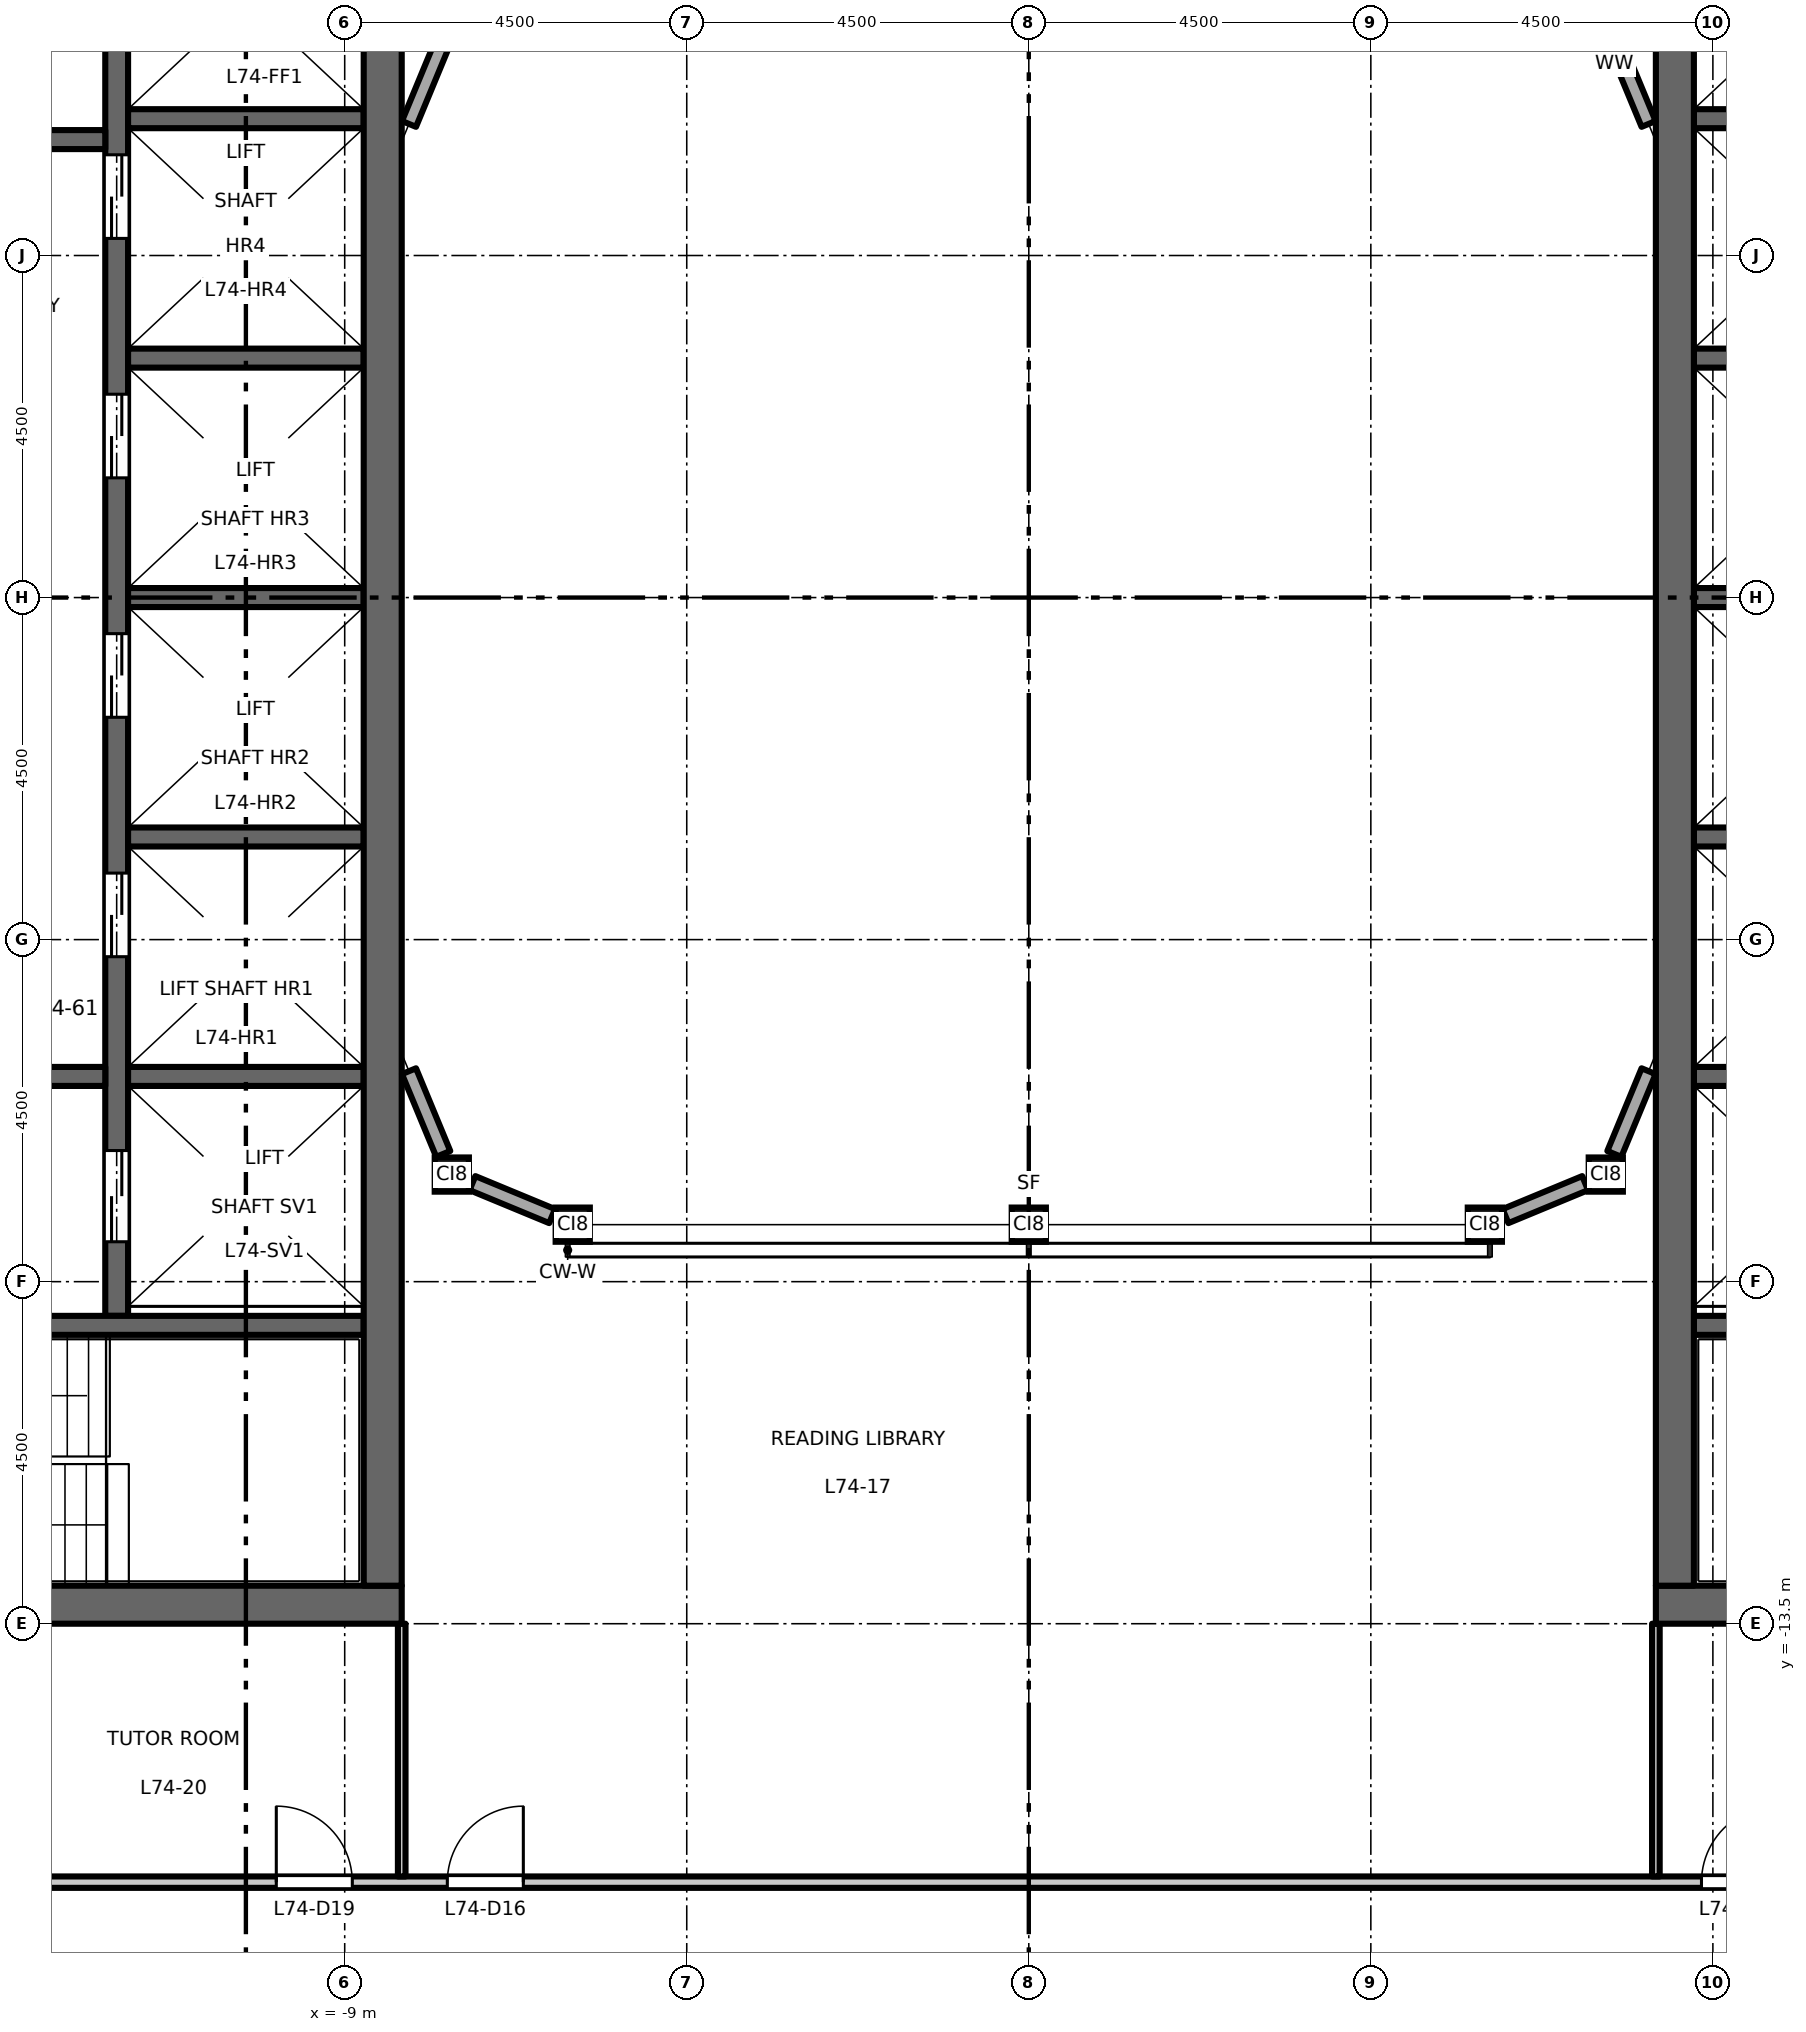
"""IFC4 building model, lengths in metres.
Left out: names, types, materials, properties, quantities, classifications, styles, units other than length and angle.
Written with IfcOpenShell. Run it as: python <this file> out.ifc"""

import sys

from ifc_helpers import new_model, si_unit, direction, frame, frame_2d, origin, origin_2d, place, context, subcontext, project, spatial, rectangle, hollow_rectangle, extrude, element, fill, save


model = new_model("IFC4")
c1 = context("Model", 3, precision=1e-05, world=origin(), true_north=direction((0.0, 1.0)))
c2 = subcontext(c1, "Body", "Model", "MODEL_VIEW")
j1 = project(units=[si_unit("LENGTHUNIT", "METRE"), si_unit("PLANEANGLEUNIT", "RADIAN")], contexts=[c1])
p1 = place(None, origin())
s1 = spatial("IfcSite", under=j1, at=p1, CompositionType="ELEMENT")
p2 = place(p1, origin())
s2 = spatial("IfcBuilding", under=s1, at=p2, CompositionType="ELEMENT")
p3 = place(p2, frame((0.0, 0.0, 343.7)))
s3 = spatial("IfcBuildingStorey", under=s2, at=p3, CompositionType="ELEMENT", Elevation=343.7)
for number, where, z_axis, x_axis in (
    (1, (-7.591, -7.591, 0.0), (0.0, 0.0, 1.0), (1.0, 0.0, 0.0)),
    (2, (-6.0, -8.25, 0.0), (0.0, 0.0, 1.0), (1.0, 0.0, 0.0)),
    (3, (0.0, -8.25, 0.0), (0.0, 0.0, 1.0), (1.0, 0.0, 0.0)),
    (4, (6.0, -8.25, 0.0), (0.0, 0.0, 1.0), (1.0, 0.0, 0.0)),
    (5, (7.591, -7.591, 0.0), (0.0, 0.0, 1.0), (1.0, 0.0, 0.0)),
):
    element("IfcColumn", number, at=place(p3, frame(where, z_axis=z_axis, x_axis=x_axis)), inside=s3, PredefinedType="COLUMN", context=c2, shape_type="SweptSolid", body=[
        extrude(hollow_rectangle(XDim=0.45, YDim=0.45, WallThickness=0.022, at=origin_2d()), origin(), (0.0, 0.0, 1.0), 4.5),
    ])
p4 = place(p3, frame((-12.0, -9.45, 0.0), z_axis=(0.0, 0.0, 1.0), x_axis=(0.0, 1.0, 0.0)))
e6 = element("IfcWall", 6, at=p4, inside=s3, PredefinedType="SHEAR", context=c2, shape_type="SweptSolid", body=[
    extrude(rectangle(XDim=18.9, YDim=0.3, at=frame_2d((9.45, 0.0))), origin(), (0.0, 0.0, 1.0), 4.3),
])
p5 = place(p4, frame((4.725, 0.0, 0.0)))
e7 = element("IfcOpeningElement", 7, at=p5, cuts=e6, PredefinedType="OPENING", context=c2, shape_type="SweptSolid", body=[
    extrude(rectangle(XDim=1.1, YDim=2.1, at=frame_2d((0.55, 1.05))), frame((0.0, 0.16, 0.0), z_axis=(0.0, -1.0, 0.0), x_axis=(1.0, 0.0, 0.0)), (0.0, 0.0, 1.0), 0.32),
])
p6 = place(p4, frame((7.875, 0.0, 0.0)))
e8 = element("IfcOpeningElement", 8, at=p6, cuts=e6, PredefinedType="OPENING", context=c2, shape_type="SweptSolid", body=[
    extrude(rectangle(XDim=1.1, YDim=2.1, at=frame_2d((0.55, 1.05))), frame((0.0, 0.16, 0.0), z_axis=(0.0, -1.0, 0.0), x_axis=(1.0, 0.0, 0.0)), (0.0, 0.0, 1.0), 0.32),
])
p7 = place(p4, frame((11.025, 0.0, 0.0)))
e9 = element("IfcOpeningElement", 9, at=p7, cuts=e6, PredefinedType="OPENING", context=c2, shape_type="SweptSolid", body=[
    extrude(rectangle(XDim=1.1, YDim=2.1, at=frame_2d((0.55, 1.05))), frame((0.0, 0.16, 0.0), z_axis=(0.0, -1.0, 0.0), x_axis=(1.0, 0.0, 0.0)), (0.0, 0.0, 1.0), 0.32),
])
p8 = place(p4, frame((14.175, 0.0, 0.0)))
e10 = element("IfcOpeningElement", 10, at=p8, cuts=e6, PredefinedType="OPENING", context=c2, shape_type="SweptSolid", body=[
    extrude(rectangle(XDim=1.1, YDim=2.1, at=frame_2d((0.55, 1.05))), frame((0.0, 0.16, 0.0), z_axis=(0.0, -1.0, 0.0), x_axis=(1.0, 0.0, 0.0)), (0.0, 0.0, 1.0), 0.32),
])
p9 = place(p4, frame((16.725, 0.0, 0.0)))
e11 = element("IfcOpeningElement", 11, at=p9, cuts=e6, PredefinedType="OPENING", context=c2, shape_type="SweptSolid", body=[
    extrude(rectangle(XDim=1.2, YDim=2.1, at=frame_2d((0.6, 1.05))), frame((0.0, 0.16, 0.0), z_axis=(0.0, -1.0, 0.0), x_axis=(1.0, 0.0, 0.0)), (0.0, 0.0, 1.0), 0.32),
])
p10 = place(p4, frame((0.975, 0.0, 0.0)))
e12 = element("IfcOpeningElement", 12, at=p10, cuts=e6, PredefinedType="OPENING", context=c2, shape_type="SweptSolid", body=[
    extrude(rectangle(XDim=1.2, YDim=2.1, at=frame_2d((0.6, 1.05))), frame((0.0, 0.16, 0.0), z_axis=(0.0, -1.0, 0.0), x_axis=(1.0, 0.0, 0.0)), (0.0, 0.0, 1.0), 0.32),
])
p11 = place(p3, frame((-12.15, 6.025, 0.0), z_axis=(0.0, 0.0, 1.0), x_axis=(-1.0, 0.0, 0.0)))
e13 = element("IfcWall", 13, at=p11, inside=s3, PredefinedType="SHEAR", context=c2, shape_type="SweptSolid", body=[
    extrude(rectangle(XDim=4.6, YDim=0.25, at=frame_2d((2.3, 0.0))), origin(), (0.0, 0.0, 1.0), 4.3),
])
p12 = place(p11, frame((1.8, 0.0, 0.0)))
e14 = element("IfcOpeningElement", 14, at=p12, cuts=e13, PredefinedType="OPENING", context=c2, shape_type="SweptSolid", body=[
    extrude(rectangle(XDim=1.0, YDim=2.1, at=frame_2d((0.5, 1.05))), frame((0.0, 0.135, 0.0), z_axis=(0.0, -1.0, 0.0), x_axis=(1.0, 0.0, 0.0)), (0.0, 0.0, 1.0), 0.27),
])
p13 = place(p3, frame((-12.15, -6.3, 0.0), z_axis=(0.0, 0.0, 1.0), x_axis=(-1.0, 0.0, 0.0)))
e15 = element("IfcWall", 15, at=p13, inside=s3, PredefinedType="SHEAR", context=c2, shape_type="SweptSolid", body=[
    extrude(rectangle(XDim=4.6, YDim=0.25, at=frame_2d((2.3, 0.0))), origin(), (0.0, 0.0, 1.0), 4.3),
])
p14 = place(p13, frame((1.8, 0.0, 0.0)))
e16 = element("IfcOpeningElement", 16, at=p14, cuts=e15, PredefinedType="OPENING", context=c2, shape_type="SweptSolid", body=[
    extrude(rectangle(XDim=1.0, YDim=2.1, at=frame_2d((0.5, 1.05))), frame((0.0, 0.135, 0.0), z_axis=(0.0, -1.0, 0.0), x_axis=(1.0, 0.0, 0.0)), (0.0, 0.0, 1.0), 0.27),
])
for number, where, z_axis, x_axis in (
    (17, (-8.75, 0.0, 0.0), (0.0, 0.0, 1.0), (-1.0, 0.0, 0.0)),
    (18, (-8.75, 3.15, 0.0), (0.0, 0.0, 1.0), (-1.0, 0.0, 0.0)),
    (19, (-8.75, 6.3, 0.0), (0.0, 0.0, 1.0), (-1.0, 0.0, 0.0)),
    (20, (-8.75, -3.15, 0.0), (0.0, 0.0, 1.0), (-1.0, 0.0, 0.0)),
    (21, (-8.75, -6.3, 0.0), (0.0, 0.0, 1.0), (-1.0, 0.0, 0.0)),
):
    element("IfcWall", number, at=place(p3, frame(where, z_axis=z_axis, x_axis=x_axis)), inside=s3, PredefinedType="SHEAR", context=c2, shape_type="SweptSolid", body=[
        extrude(rectangle(XDim=3.1, YDim=0.25, at=frame_2d((1.55, 0.0))), origin(), (0.0, 0.0, 1.0), 4.3),
    ])
p15 = place(p3, frame((-8.75, -9.575, 0.0), z_axis=(0.0, 0.0, 1.0), x_axis=(-1.0, 0.0, 0.0)))
e22 = element("IfcWall", 22, at=p15, inside=s3, PredefinedType="SHEAR", context=c2, shape_type="SweptSolid", body=[
    extrude(rectangle(XDim=8.0, YDim=0.25, at=frame_2d((4.0, 0.0))), origin(), (0.0, 0.0, 1.0), 4.3),
])
p16 = place(p15, frame((6.65, 0.0, 0.0)))
e23 = element("IfcOpeningElement", 23, at=p16, cuts=e22, PredefinedType="OPENING", context=c2, shape_type="SweptSolid", body=[
    extrude(rectangle(XDim=1.1, YDim=2.1, at=frame_2d((0.55, 1.05))), frame((0.0, 0.135, 0.0), z_axis=(0.0, -1.0, 0.0), x_axis=(1.0, 0.0, 0.0)), (0.0, 0.0, 1.0), 0.27),
])
p17 = place(p3, frame((-8.25, -13.25, 0.0), z_axis=(0.0, 0.0, 1.0), x_axis=(-1.0, 0.0, 0.0)))
e24 = element("IfcWall", 24, at=p17, inside=s3, PredefinedType="SHEAR", context=c2, shape_type="SweptSolid", body=[
    extrude(rectangle(XDim=9.0, YDim=0.5, at=frame_2d((4.5, 0.0))), origin(), (0.0, 0.0, 1.0), 4.3),
])
p18 = place(p3, frame((-8.5, -13.0, 0.0), z_axis=(0.0, 0.0, 1.0), x_axis=(0.0, 1.0, 0.0)))
e25 = element("IfcWall", 25, at=p18, inside=s3, PredefinedType="SHEAR", context=c2, shape_type="SweptSolid", body=[
    extrude(rectangle(XDim=26.0, YDim=0.5, at=frame_2d((13.0, 0.0))), origin(), (0.0, 0.0, 1.0), 4.3),
])
for number, where, z_axis, x_axis in (
    (26, (8.75, 0.0, 0.0), (0.0, 0.0, 1.0), (1.0, 0.0, 0.0)),
    (27, (8.75, 3.15, 0.0), (0.0, 0.0, 1.0), (1.0, 0.0, 0.0)),
    (28, (8.75, 6.3, 0.0), (0.0, 0.0, 1.0), (1.0, 0.0, 0.0)),
    (29, (8.75, -3.15, 0.0), (0.0, 0.0, 1.0), (1.0, 0.0, 0.0)),
    (30, (8.75, -6.3, 0.0), (0.0, 0.0, 1.0), (1.0, 0.0, 0.0)),
):
    element("IfcWall", number, at=place(p3, frame(where, z_axis=z_axis, x_axis=x_axis)), inside=s3, PredefinedType="SHEAR", context=c2, shape_type="SweptSolid", body=[
        extrude(rectangle(XDim=3.1, YDim=0.25, at=frame_2d((1.55, 0.0))), origin(), (0.0, 0.0, 1.0), 4.3),
    ])
p19 = place(p3, frame((8.75, -9.575, 0.0), z_axis=(0.0, 0.0, 1.0), x_axis=(1.0, 0.0, 0.0)))
e31 = element("IfcWall", 31, at=p19, inside=s3, PredefinedType="SHEAR", context=c2, shape_type="SweptSolid", body=[
    extrude(rectangle(XDim=8.0, YDim=0.25, at=frame_2d((4.0, 0.0))), origin(), (0.0, 0.0, 1.0), 4.3),
])
p20 = place(p19, frame((6.65, 0.0, 0.0)))
e32 = element("IfcOpeningElement", 32, at=p20, cuts=e31, PredefinedType="OPENING", context=c2, shape_type="SweptSolid", body=[
    extrude(rectangle(XDim=1.1, YDim=2.1, at=frame_2d((0.55, 1.05))), frame((0.0, 0.135, 0.0), z_axis=(0.0, -1.0, 0.0), x_axis=(1.0, 0.0, 0.0)), (0.0, 0.0, 1.0), 0.27),
])
p21 = place(p3, frame((8.25, -13.25, 0.0), z_axis=(0.0, 0.0, 1.0), x_axis=(1.0, 0.0, 0.0)))
e33 = element("IfcWall", 33, at=p21, inside=s3, PredefinedType="SHEAR", context=c2, shape_type="SweptSolid", body=[
    extrude(rectangle(XDim=9.0, YDim=0.5, at=frame_2d((4.5, 0.0))), origin(), (0.0, 0.0, 1.0), 4.3),
])
p22 = place(p3, frame((8.5, -13.0, 0.0), z_axis=(0.0, 0.0, 1.0), x_axis=(0.0, 1.0, 0.0)))
e34 = element("IfcWall", 34, at=p22, inside=s3, PredefinedType="SHEAR", context=c2, shape_type="SweptSolid", body=[
    extrude(rectangle(XDim=26.0, YDim=0.5, at=frame_2d((13.0, 0.0))), origin(), (0.0, 0.0, 1.0), 4.3),
])
p23 = place(p3, frame((6.271, -8.137, 0.0), z_axis=(0.0, 0.0, 1.0), x_axis=(0.923864661962, 0.382719331074, 0.0)))
e35 = element("IfcWall", 35, at=p23, inside=s3, PredefinedType="STANDARD", context=c2, shape_type="SweptSolid", body=[
    extrude(rectangle(XDim=1.134, YDim=0.2, at=frame_2d((0.567, 0.0))), origin(), (0.0, 0.0, 1.0), 3.96),
])
for number, where, z_axis, x_axis in (
    (36, (7.703, -7.319, 0.0), (0.0, 0.0, 1.0), (0.383, 0.924, 0.0)),
    (37, (8.154, 6.231, 0.0), (0.0, 0.0, 1.0), (-0.383, 0.924, 0.0)),
    (38, (-7.703, 7.319, 0.0), (0.0, 0.0, 1.0), (-0.383, -0.924, 0.0)),
    (39, (-8.154, -6.231, 0.0), (0.0, 0.0, 1.0), (0.383, -0.924, 0.0)),
):
    element("IfcWall", number, at=place(p3, frame(where, z_axis=z_axis, x_axis=x_axis)), inside=s3, PredefinedType="STANDARD", context=c2, shape_type="SweptSolid", body=[
        extrude(rectangle(XDim=1.178, YDim=0.2, at=frame_2d((0.589, 0.0))), origin(), (0.0, 0.0, 1.0), 3.96),
    ])
p24 = place(p3, frame((-7.319, -7.703, 0.0), z_axis=(0.0, 0.0, 1.0), x_axis=(0.923864661962, -0.382719331074, 0.0)))
e40 = element("IfcWall", 40, at=p24, inside=s3, PredefinedType="STANDARD", context=c2, shape_type="SweptSolid", body=[
    extrude(rectangle(XDim=1.134, YDim=0.2, at=frame_2d((0.567, 0.0))), origin(), (0.0, 0.0, 1.0), 3.96),
])
p25 = place(p3, frame((-17.325, -16.9, 0.0), z_axis=(0.0, 0.0, 1.0), x_axis=(1.0, 0.0, 0.0)))
e41 = element("IfcWall", 41, at=p25, inside=s3, PredefinedType="PARTITIONING", context=c2, shape_type="SweptSolid", body=[
    extrude(rectangle(XDim=34.65, YDim=0.15, at=frame_2d((17.325, 0.0))), origin(), (0.0, 0.0, 1.0), 4.3),
])
p26 = place(p25, frame((9.675, 0.0, 0.0)))
e42 = element("IfcOpeningElement", 42, at=p26, cuts=e41, PredefinedType="OPENING", context=c2, shape_type="SweptSolid", body=[
    extrude(rectangle(XDim=1.0, YDim=2.1, at=frame_2d((0.5, 1.05))), frame((0.0, 0.085, 0.0), z_axis=(0.0, -1.0, 0.0), x_axis=(1.0, 0.0, 0.0)), (0.0, 0.0, 1.0), 0.17),
])
p27 = place(p25, frame((7.425, 0.0, 0.0)))
e43 = element("IfcOpeningElement", 43, at=p27, cuts=e41, PredefinedType="OPENING", context=c2, shape_type="SweptSolid", body=[
    extrude(rectangle(XDim=1.0, YDim=2.1, at=frame_2d((0.5, 1.05))), frame((0.0, 0.085, 0.0), z_axis=(0.0, -1.0, 0.0), x_axis=(1.0, 0.0, 0.0)), (0.0, 0.0, 1.0), 0.17),
])
p28 = place(p25, frame((26.175, 0.0, 0.0)))
e44 = element("IfcOpeningElement", 44, at=p28, cuts=e41, PredefinedType="OPENING", context=c2, shape_type="SweptSolid", body=[
    extrude(rectangle(XDim=1.0, YDim=2.1, at=frame_2d((0.5, 1.05))), frame((0.0, 0.085, 0.0), z_axis=(0.0, -1.0, 0.0), x_axis=(1.0, 0.0, 0.0)), (0.0, 0.0, 1.0), 0.17),
])
for number, where, z_axis, x_axis in (
    (45, (-8.25, -16.825, 0.0), (0.0, 0.0, 1.0), (0.0, 1.0, 0.0)),
    (46, (8.25, -16.825, 0.0), (0.0, 0.0, 1.0), (0.0, 1.0, 0.0)),
):
    element("IfcWall", number, at=place(p3, frame(where, z_axis=z_axis, x_axis=x_axis)), inside=s3, PredefinedType="PARTITIONING", context=c2, shape_type="SweptSolid", body=[
        extrude(rectangle(XDim=3.325, YDim=0.1, at=frame_2d((1.663, 0.0))), origin(), (0.0, 0.0, 1.0), 4.3),
    ])
p29 = place(p5, origin())
e47 = element("IfcDoor", 47, at=p29, inside=s3, OperationType="DOUBLE_DOOR_SLIDING", PredefinedType="DOOR", context=c2, shape_type="SweptSolid", body=[
    extrude(rectangle(XDim=1.1, YDim=2.1, at=frame_2d((0.55, 1.05))), frame((0.0, 0.025, 0.0), z_axis=(0.0, -1.0, 0.0), x_axis=(1.0, 0.0, 0.0)), (0.0, 0.0, 1.0), 0.05),
])
fill(e7, e47)
p30 = place(p6, origin())
e48 = element("IfcDoor", 48, at=p30, inside=s3, OperationType="DOUBLE_DOOR_SLIDING", PredefinedType="DOOR", context=c2, shape_type="SweptSolid", body=[
    extrude(rectangle(XDim=1.1, YDim=2.1, at=frame_2d((0.55, 1.05))), frame((0.0, 0.025, 0.0), z_axis=(0.0, -1.0, 0.0), x_axis=(1.0, 0.0, 0.0)), (0.0, 0.0, 1.0), 0.05),
])
fill(e8, e48)
p31 = place(p7, origin())
e49 = element("IfcDoor", 49, at=p31, inside=s3, OperationType="DOUBLE_DOOR_SLIDING", PredefinedType="DOOR", context=c2, shape_type="SweptSolid", body=[
    extrude(rectangle(XDim=1.1, YDim=2.1, at=frame_2d((0.55, 1.05))), frame((0.0, 0.025, 0.0), z_axis=(0.0, -1.0, 0.0), x_axis=(1.0, 0.0, 0.0)), (0.0, 0.0, 1.0), 0.05),
])
fill(e9, e49)
p32 = place(p8, origin())
e50 = element("IfcDoor", 50, at=p32, inside=s3, OperationType="DOUBLE_DOOR_SLIDING", PredefinedType="DOOR", context=c2, shape_type="SweptSolid", body=[
    extrude(rectangle(XDim=1.1, YDim=2.1, at=frame_2d((0.55, 1.05))), frame((0.0, 0.025, 0.0), z_axis=(0.0, -1.0, 0.0), x_axis=(1.0, 0.0, 0.0)), (0.0, 0.0, 1.0), 0.05),
])
fill(e10, e50)
p33 = place(p10, origin())
e51 = element("IfcDoor", 51, at=p33, inside=s3, OperationType="DOUBLE_DOOR_SLIDING", PredefinedType="DOOR", context=c2, shape_type="SweptSolid", body=[
    extrude(rectangle(XDim=1.2, YDim=2.1, at=frame_2d((0.6, 1.05))), frame((0.0, 0.025, 0.0), z_axis=(0.0, -1.0, 0.0), x_axis=(1.0, 0.0, 0.0)), (0.0, 0.0, 1.0), 0.05),
])
fill(e12, e51)
p34 = place(p26, origin())
e52 = element("IfcDoor", 52, at=p34, inside=s3, OperationType="SINGLE_SWING_RIGHT", PredefinedType="DOOR", context=c2, shape_type="SweptSolid", body=[
    extrude(rectangle(XDim=1.0, YDim=2.1, at=frame_2d((0.5, 1.05))), frame((0.0, 0.025, 0.0), z_axis=(0.0, -1.0, 0.0), x_axis=(1.0, 0.0, 0.0)), (0.0, 0.0, 1.0), 0.05),
])
fill(e42, e52)
p35 = place(p27, origin())
e53 = element("IfcDoor", 53, at=p35, inside=s3, OperationType="SINGLE_SWING_LEFT", PredefinedType="DOOR", context=c2, shape_type="SweptSolid", body=[
    extrude(rectangle(XDim=1.0, YDim=2.1, at=frame_2d((0.5, 1.05))), frame((0.0, 0.025, 0.0), z_axis=(0.0, -1.0, 0.0), x_axis=(1.0, 0.0, 0.0)), (0.0, 0.0, 1.0), 0.05),
])
fill(e43, e53)
p36 = place(p28, origin())
e54 = element("IfcDoor", 54, at=p36, inside=s3, OperationType="SINGLE_SWING_RIGHT", PredefinedType="DOOR", context=c2, shape_type="SweptSolid", body=[
    extrude(rectangle(XDim=1.0, YDim=2.1, at=frame_2d((0.5, 1.05))), frame((0.0, 0.025, 0.0), z_axis=(0.0, -1.0, 0.0), x_axis=(1.0, 0.0, 0.0)), (0.0, 0.0, 1.0), 0.05),
])
fill(e44, e54)
save(model, sys.argv[1])
